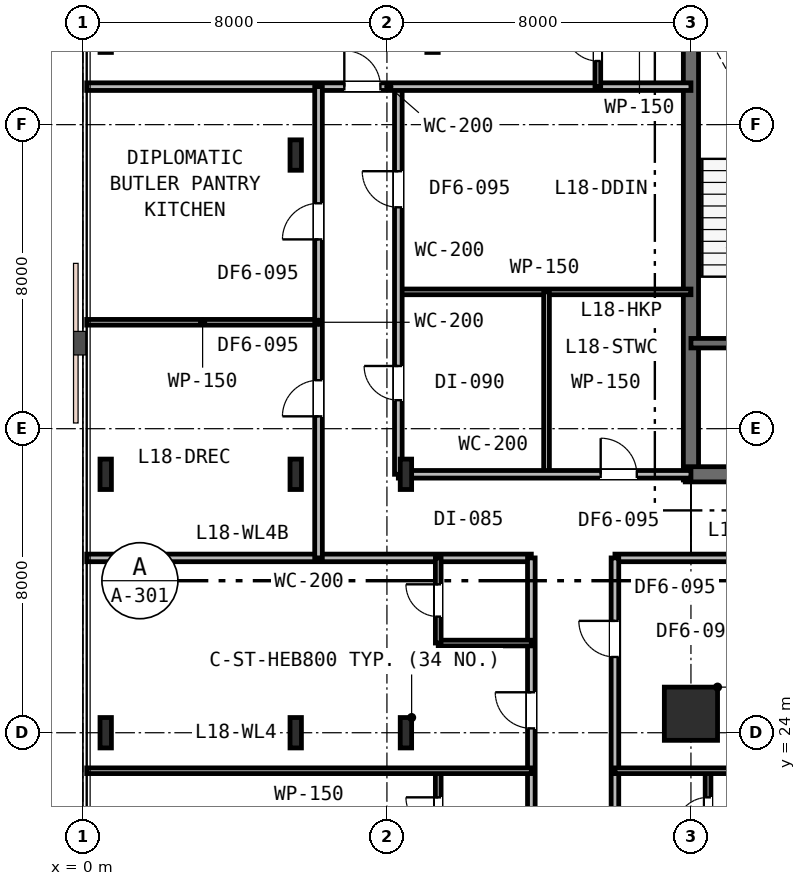
"""IFC4 building model, lengths in metres.
Left out: names, types, materials, properties, quantities, classifications, styles, units other than length and angle.
Written with IfcOpenShell. Run it as: python <this file> out.ifc"""

import sys

from ifc_helpers import new_model, si_unit, direction, frame, frame_2d, origin, origin_2d, place, context, subcontext, project, spatial, rectangle, i_section, extrude, element, fill, save


model = new_model("IFC4")
c1 = context("Model", 3, precision=1e-05, world=origin(), true_north=direction((0.0, 1.0)))
c2 = subcontext(c1, "Body", "Model", "MODEL_VIEW")
j1 = project(units=[si_unit("LENGTHUNIT", "METRE"), si_unit("PLANEANGLEUNIT", "RADIAN")], contexts=[c1])
p1 = place(None, origin())
s1 = spatial("IfcSite", under=j1, at=p1, CompositionType="ELEMENT")
p2 = place(p1, origin())
s2 = spatial("IfcBuilding", under=s1, at=p2, CompositionType="ELEMENT")
p3 = place(p2, frame((0.0, 0.0, 72.6)))
s3 = spatial("IfcBuildingStorey", under=s2, at=p3, CompositionType="ELEMENT", Elevation=72.6)
p4 = place(p3, frame((16.0, 30.65, 0.0), z_axis=(0.0, 0.0, 1.0), x_axis=(0.0, 1.0, 0.0)))
e1 = element("IfcWall", 1, at=p4, inside=s3, PredefinedType="SHEAR", context=c2, shape_type="SweptSolid", body=[
    extrude(rectangle(XDim=12.3, YDim=0.4, at=frame_2d((6.15, 0.0))), origin(), (0.0, 0.0, 1.0), 3.6),
])
p5 = place(p3, frame((15.85, 30.8, 0.0), z_axis=(0.0, 0.0, 1.0), x_axis=(1.0, 0.0, 0.0)))
e2 = element("IfcWall", 2, at=p5, inside=s3, PredefinedType="SHEAR", context=c2, shape_type="SweptSolid", body=[
    extrude(rectangle(XDim=11.2, YDim=0.4, at=frame_2d((5.6, 0.0))), origin(), (0.0, 0.0, 1.0), 3.6),
])
p6 = place(p5, frame((2.45, 0.0, 0.0)))
e3 = element("IfcOpeningElement", 3, at=p6, cuts=e2, PredefinedType="OPENING", context=c2, shape_type="SweptSolid", body=[
    extrude(rectangle(XDim=1.1, YDim=2.15, at=frame_2d((0.55, 1.075))), frame((0.0, 0.21, 0.0), z_axis=(0.0, -1.0, 0.0), x_axis=(1.0, 0.0, 0.0)), (0.0, 0.0, 1.0), 0.42),
])
p7 = place(p3, frame((16.0, 34.25, 0.0), z_axis=(0.0, 0.0, 1.0), x_axis=(1.0, 0.0, 0.0)))
e4 = element("IfcWall", 4, at=p7, inside=s3, PredefinedType="SHEAR", context=c2, shape_type="SweptSolid", body=[
    extrude(rectangle(XDim=6.05, YDim=0.25, at=frame_2d((3.025, 0.0))), origin(), (0.0, 0.0, 1.0), 3.6),
])
p8 = place(p7, frame((1.25, 0.0, 0.0)))
e5 = element("IfcOpeningElement", 5, at=p8, cuts=e4, PredefinedType="OPENING", context=c2, shape_type="SweptSolid", body=[
    extrude(rectangle(XDim=1.0, YDim=2.15, at=frame_2d((0.5, 1.075))), frame((0.0, 0.135, 0.0), z_axis=(0.0, -1.0, 0.0), x_axis=(1.0, 0.0, 0.0)), (0.0, 0.0, 1.0), 0.27),
])
p9 = place(p7, frame((4.2, 0.0, 0.0)))
e6 = element("IfcOpeningElement", 6, at=p9, cuts=e4, PredefinedType="OPENING", context=c2, shape_type="SweptSolid", body=[
    extrude(rectangle(XDim=1.1, YDim=2.15, at=frame_2d((0.55, 1.075))), frame((0.0, 0.135, 0.0), z_axis=(0.0, -1.0, 0.0), x_axis=(1.0, 0.0, 0.0)), (0.0, 0.0, 1.0), 0.27),
])
p10 = place(p3, frame((8.5, 24.0, 0.0), z_axis=(0.0, 0.0, 1.0), x_axis=(1.0, 0.0, 0.0)))
e7 = element("IfcColumn", 7, at=p10, inside=s3, PredefinedType="COLUMN", context=c2, shape_type="SweptSolid", body=[
    extrude(i_section(OverallWidth=0.3, OverallDepth=0.8, WebThickness=0.018, FlangeThickness=0.033, FilletRadius=0.03, at=origin_2d()), origin(), (0.0, 0.0, 1.0), 3.6),
])
p11 = place(p3, frame((16.0, 24.5, 0.0), z_axis=(0.0, 0.0, 1.0), x_axis=(1.0, 0.0, 0.0)))
e8 = element("IfcColumn", 8, at=p11, inside=s3, PredefinedType="COLUMN", context=c2, shape_type="SweptSolid", body=[
    extrude(rectangle(XDim=1.4, YDim=1.4, at=origin_2d()), origin(), (0.0, 0.0, 1.0), 3.6),
])
for number, where, z_axis, x_axis in (
    (9, (5.6, 24.0, 0.0), (0.0, 0.0, 1.0), (1.0, 0.0, 0.0)),
    (10, (5.6, 30.8, 0.0), (0.0, 0.0, 1.0), (1.0, 0.0, 0.0)),
    (11, (5.6, 39.2, 0.0), (0.0, 0.0, 1.0), (1.0, 0.0, 0.0)),
    (12, (8.5, 30.8, 0.0), (0.0, 0.0, 1.0), (1.0, 0.0, 0.0)),
    (13, (9.2, 42.3, 0.0), (0.0, 0.0, 1.0), (1.0, 0.0, 0.0)),
    (14, (0.6, 24.0, 0.0), (0.0, 0.0, 1.0), (1.0, 0.0, 0.0)),
    (15, (0.6, 30.8, 0.0), (0.0, 0.0, 1.0), (1.0, 0.0, 0.0)),
    (16, (0.6, 42.3, 0.0), (0.0, 0.0, 1.0), (1.0, 0.0, 0.0)),
):
    element("IfcColumn", number, at=place(p3, frame(where, z_axis=z_axis, x_axis=x_axis)), inside=s3, PredefinedType="COLUMN", context=c2, shape_type="SweptSolid", body=[
        extrude(i_section(OverallWidth=0.3, OverallDepth=0.8, WebThickness=0.018, FlangeThickness=0.033, FilletRadius=0.03, at=origin_2d()), origin(), (0.0, 0.0, 1.0), 3.6),
    ])
p12 = place(p3, frame((0.1, 28.6, 0.0), z_axis=(0.0, 0.0, 1.0), x_axis=(1.0, 0.0, 0.0)))
e17 = element("IfcWall", 17, at=p12, inside=s3, PredefinedType="PARTITIONING", context=c2, shape_type="SweptSolid", body=[
    extrude(rectangle(XDim=11.7, YDim=0.2, at=frame_2d((5.85, 0.0))), origin(), (0.0, 0.0, 1.0), 2.83),
])
p13 = place(p3, frame((14.0, 28.6, 0.0), z_axis=(0.0, 0.0, 1.0), x_axis=(1.0, 0.0, 0.0)))
e18 = element("IfcWall", 18, at=p13, inside=s3, PredefinedType="PARTITIONING", context=c2, shape_type="SweptSolid", body=[
    extrude(rectangle(XDim=36.4, YDim=0.2, at=frame_2d((18.2, 0.0))), origin(), (0.0, 0.0, 1.0), 2.83),
])
p14 = place(p13, frame((15.475, 0.0, 0.0)))
e19 = element("IfcOpeningElement", 19, at=p14, cuts=e18, PredefinedType="OPENING", context=c2, shape_type="SweptSolid", body=[
    extrude(rectangle(XDim=0.95, YDim=2.15, at=frame_2d((0.475, 1.075))), frame((0.0, 0.11, 0.0), z_axis=(0.0, -1.0, 0.0), x_axis=(1.0, 0.0, 0.0)), (0.0, 0.0, 1.0), 0.22),
])
p15 = place(p13, frame((27.986, 0.0, 0.0)))
e20 = element("IfcOpeningElement", 20, at=p15, cuts=e18, PredefinedType="OPENING", context=c2, shape_type="SweptSolid", body=[
    extrude(rectangle(XDim=0.95, YDim=2.15, at=frame_2d((0.475, 1.075))), frame((0.0, 0.11, 0.0), z_axis=(0.0, -1.0, 0.0), x_axis=(1.0, 0.0, 0.0)), (0.0, 0.0, 1.0), 0.22),
])
p16 = place(p3, frame((8.3, 35.6, 0.0), z_axis=(0.0, 0.0, 1.0), x_axis=(1.0, 0.0, 0.0)))
e21 = element("IfcWall", 21, at=p16, inside=s3, PredefinedType="PARTITIONING", context=c2, shape_type="SweptSolid", body=[
    extrude(rectangle(XDim=7.7, YDim=0.15, at=frame_2d((3.85, 0.0))), origin(), (0.0, 0.0, 1.0), 2.83),
])
p17 = place(p3, frame((12.2, 30.8, 0.0), z_axis=(0.0, 0.0, 1.0), x_axis=(0.0, 1.0, 0.0)))
e22 = element("IfcWall", 22, at=p17, inside=s3, PredefinedType="PARTITIONING", context=c2, shape_type="SweptSolid", body=[
    extrude(rectangle(XDim=4.8, YDim=0.15, at=frame_2d((2.4, 0.0))), origin(), (0.0, 0.0, 1.0), 2.83),
])
p18 = place(p3, frame((8.3, 30.8, 0.0), z_axis=(0.0, 0.0, 1.0), x_axis=(1.0, 0.0, 0.0)))
e23 = element("IfcWall", 23, at=p18, inside=s3, PredefinedType="PARTITIONING", context=c2, shape_type="SweptSolid", body=[
    extrude(rectangle(XDim=7.7, YDim=0.2, at=frame_2d((3.85, 0.0))), origin(), (0.0, 0.0, 1.0), 2.83),
])
p19 = place(p18, frame((5.325, 0.0, 0.0)))
e24 = element("IfcOpeningElement", 24, at=p19, cuts=e23, PredefinedType="OPENING", context=c2, shape_type="SweptSolid", body=[
    extrude(rectangle(XDim=0.95, YDim=2.15, at=frame_2d((0.475, 1.075))), frame((0.0, 0.11, 0.0), z_axis=(0.0, -1.0, 0.0), x_axis=(1.0, 0.0, 0.0)), (0.0, 0.0, 1.0), 0.22),
])
p20 = place(p3, frame((8.3, 30.8, 0.0), z_axis=(0.0, 0.0, 1.0), x_axis=(0.0, 1.0, 0.0)))
e25 = element("IfcWall", 25, at=p20, inside=s3, PredefinedType="PARTITIONING", context=c2, shape_type="SweptSolid", body=[
    extrude(rectangle(XDim=10.2, YDim=0.2, at=frame_2d((5.1, 0.0))), origin(), (0.0, 0.0, 1.0), 2.83),
])
p21 = place(p20, frame((1.95, 0.0, 0.0)))
e26 = element("IfcOpeningElement", 26, at=p21, cuts=e25, PredefinedType="OPENING", context=c2, shape_type="SweptSolid", body=[
    extrude(rectangle(XDim=0.9, YDim=2.15, at=frame_2d((0.45, 1.075))), frame((0.0, 0.11, 0.0), z_axis=(0.0, -1.0, 0.0), x_axis=(1.0, 0.0, 0.0)), (0.0, 0.0, 1.0), 0.22),
])
p22 = place(p20, frame((7.025, 0.0, 0.0)))
e27 = element("IfcOpeningElement", 27, at=p22, cuts=e25, PredefinedType="OPENING", context=c2, shape_type="SweptSolid", body=[
    extrude(rectangle(XDim=0.95, YDim=2.15, at=frame_2d((0.475, 1.075))), frame((0.0, 0.11, 0.0), z_axis=(0.0, -1.0, 0.0), x_axis=(1.0, 0.0, 0.0)), (0.0, 0.0, 1.0), 0.22),
])
p23 = place(p3, frame((0.1, 41.0, 0.0), z_axis=(0.0, 0.0, 1.0), x_axis=(1.0, 0.0, 0.0)))
e28 = element("IfcWall", 28, at=p23, inside=s3, PredefinedType="PARTITIONING", context=c2, shape_type="SweptSolid", body=[
    extrude(rectangle(XDim=15.9, YDim=0.2, at=frame_2d((7.95, 0.0))), origin(), (0.0, 0.0, 1.0), 2.83),
])
p24 = place(p23, frame((6.779, 0.0, 0.0)))
e29 = element("IfcOpeningElement", 29, at=p24, cuts=e28, PredefinedType="OPENING", context=c2, shape_type="SweptSolid", body=[
    extrude(rectangle(XDim=0.95, YDim=2.15, at=frame_2d((0.475, 1.075))), frame((0.0, 0.11, 0.0), z_axis=(0.0, -1.0, 0.0), x_axis=(1.0, 0.0, 0.0)), (0.0, 0.0, 1.0), 0.22),
])
p25 = place(p3, frame((13.55, 41.0, 0.0), z_axis=(0.0, 0.0, 1.0), x_axis=(0.0, 1.0, 0.0)))
e30 = element("IfcWall", 30, at=p25, inside=s3, PredefinedType="PARTITIONING", context=c2, shape_type="SweptSolid", body=[
    extrude(rectangle(XDim=2.2, YDim=0.15, at=frame_2d((1.1, 0.0))), origin(), (0.0, 0.0, 1.0), 3.33),
])
p26 = place(p25, frame((0.675, 0.0, 0.0)))
e31 = element("IfcOpeningElement", 31, at=p26, cuts=e30, PredefinedType="OPENING", context=c2, shape_type="SweptSolid", body=[
    extrude(rectangle(XDim=0.85, YDim=2.15, at=frame_2d((0.425, 1.075))), frame((0.0, 0.085, 0.0), z_axis=(0.0, -1.0, 0.0), x_axis=(1.0, 0.0, 0.0)), (0.0, 0.0, 1.0), 0.17),
])
p27 = place(p3, frame((0.1, 34.8, 0.0), z_axis=(0.0, 0.0, 1.0), x_axis=(1.0, 0.0, 0.0)))
e32 = element("IfcWall", 32, at=p27, inside=s3, PredefinedType="PARTITIONING", context=c2, shape_type="SweptSolid", body=[
    extrude(rectangle(XDim=6.1, YDim=0.15, at=frame_2d((3.05, 0.0))), origin(), (0.0, 0.0, 1.0), 2.83),
])
p28 = place(p3, frame((6.2, 28.6, 0.0), z_axis=(0.0, 0.0, 1.0), x_axis=(0.0, 1.0, 0.0)))
e33 = element("IfcWall", 33, at=p28, inside=s3, PredefinedType="PARTITIONING", context=c2, shape_type="SweptSolid", body=[
    extrude(rectangle(XDim=12.4, YDim=0.2, at=frame_2d((6.2, 0.0))), origin(), (0.0, 0.0, 1.0), 2.83),
])
p29 = place(p28, frame((3.725, 0.0, 0.0)))
e34 = element("IfcOpeningElement", 34, at=p29, cuts=e33, PredefinedType="OPENING", context=c2, shape_type="SweptSolid", body=[
    extrude(rectangle(XDim=0.95, YDim=2.15, at=frame_2d((0.475, 1.075))), frame((0.0, 0.11, 0.0), z_axis=(0.0, -1.0, 0.0), x_axis=(1.0, 0.0, 0.0)), (0.0, 0.0, 1.0), 0.22),
])
p30 = place(p28, frame((8.381, 0.0, 0.0)))
e35 = element("IfcOpeningElement", 35, at=p30, cuts=e33, PredefinedType="OPENING", context=c2, shape_type="SweptSolid", body=[
    extrude(rectangle(XDim=0.95, YDim=2.15, at=frame_2d((0.475, 1.075))), frame((0.0, 0.11, 0.0), z_axis=(0.0, -1.0, 0.0), x_axis=(1.0, 0.0, 0.0)), (0.0, 0.0, 1.0), 0.22),
])
p31 = place(p3, frame((11.8, 5.6, 0.0), z_axis=(0.0, 0.0, 1.0), x_axis=(0.0, 1.0, 0.0)))
e36 = element("IfcWall", 36, at=p31, inside=s3, PredefinedType="PARTITIONING", context=c2, shape_type="SweptSolid", body=[
    extrude(rectangle(XDim=23.0, YDim=0.2, at=frame_2d((11.5, 0.0))), origin(), (0.0, 0.0, 1.0), 2.83),
])
p32 = place(p31, frame((1.2, 0.0, 0.0)))
e37 = element("IfcOpeningElement", 37, at=p32, cuts=e36, PredefinedType="OPENING", context=c2, shape_type="SweptSolid", body=[
    extrude(rectangle(XDim=0.95, YDim=2.15, at=frame_2d((0.475, 1.075))), frame((0.0, 0.11, 0.0), z_axis=(0.0, -1.0, 0.0), x_axis=(1.0, 0.0, 0.0)), (0.0, 0.0, 1.0), 0.22),
])
p33 = place(p31, frame((7.0, 0.0, 0.0)))
e38 = element("IfcOpeningElement", 38, at=p33, cuts=e36, PredefinedType="OPENING", context=c2, shape_type="SweptSolid", body=[
    extrude(rectangle(XDim=0.95, YDim=2.15, at=frame_2d((0.475, 1.075))), frame((0.0, 0.11, 0.0), z_axis=(0.0, -1.0, 0.0), x_axis=(1.0, 0.0, 0.0)), (0.0, 0.0, 1.0), 0.22),
])
p34 = place(p31, frame((12.8, 0.0, 0.0)))
e39 = element("IfcOpeningElement", 39, at=p34, cuts=e36, PredefinedType="OPENING", context=c2, shape_type="SweptSolid", body=[
    extrude(rectangle(XDim=0.95, YDim=2.15, at=frame_2d((0.475, 1.075))), frame((0.0, 0.11, 0.0), z_axis=(0.0, -1.0, 0.0), x_axis=(1.0, 0.0, 0.0)), (0.0, 0.0, 1.0), 0.22),
])
p35 = place(p31, frame((18.515, 0.0, 0.0)))
e40 = element("IfcOpeningElement", 40, at=p35, cuts=e36, PredefinedType="OPENING", context=c2, shape_type="SweptSolid", body=[
    extrude(rectangle(XDim=0.95, YDim=2.15, at=frame_2d((0.475, 1.075))), frame((0.0, 0.11, 0.0), z_axis=(0.0, -1.0, 0.0), x_axis=(1.0, 0.0, 0.0)), (0.0, 0.0, 1.0), 0.22),
])
p36 = place(p3, frame((14.0, 5.6, 0.0), z_axis=(0.0, 0.0, 1.0), x_axis=(0.0, 1.0, 0.0)))
e41 = element("IfcWall", 41, at=p36, inside=s3, PredefinedType="PARTITIONING", context=c2, shape_type="SweptSolid", body=[
    extrude(rectangle(XDim=23.0, YDim=0.2, at=frame_2d((11.5, 0.0))), origin(), (0.0, 0.0, 1.0), 2.83),
])
p37 = place(p36, frame((0.74, 0.0, 0.0)))
e42 = element("IfcOpeningElement", 42, at=p37, cuts=e41, PredefinedType="OPENING", context=c2, shape_type="SweptSolid", body=[
    extrude(rectangle(XDim=0.95, YDim=2.15, at=frame_2d((0.475, 1.075))), frame((0.0, 0.11, 0.0), z_axis=(0.0, -1.0, 0.0), x_axis=(1.0, 0.0, 0.0)), (0.0, 0.0, 1.0), 0.22),
])
p38 = place(p36, frame((6.271, 0.0, 0.0)))
e43 = element("IfcOpeningElement", 43, at=p38, cuts=e41, PredefinedType="OPENING", context=c2, shape_type="SweptSolid", body=[
    extrude(rectangle(XDim=0.95, YDim=2.15, at=frame_2d((0.475, 1.075))), frame((0.0, 0.11, 0.0), z_axis=(0.0, -1.0, 0.0), x_axis=(1.0, 0.0, 0.0)), (0.0, 0.0, 1.0), 0.22),
])
p39 = place(p36, frame((13.626, 0.0, 0.0)))
e44 = element("IfcOpeningElement", 44, at=p39, cuts=e41, PredefinedType="OPENING", context=c2, shape_type="SweptSolid", body=[
    extrude(rectangle(XDim=0.95, YDim=2.15, at=frame_2d((0.475, 1.075))), frame((0.0, 0.11, 0.0), z_axis=(0.0, -1.0, 0.0), x_axis=(1.0, 0.0, 0.0)), (0.0, 0.0, 1.0), 0.22),
])
p40 = place(p36, frame((20.393, 0.0, 0.0)))
e45 = element("IfcOpeningElement", 45, at=p40, cuts=e41, PredefinedType="OPENING", context=c2, shape_type="SweptSolid", body=[
    extrude(rectangle(XDim=0.95, YDim=2.15, at=frame_2d((0.475, 1.075))), frame((0.0, 0.11, 0.0), z_axis=(0.0, -1.0, 0.0), x_axis=(1.0, 0.0, 0.0)), (0.0, 0.0, 1.0), 0.22),
])
p41 = place(p3, frame((9.35, 20.75, 0.0), z_axis=(0.0, 0.0, 1.0), x_axis=(0.0, 1.0, 0.0)))
e46 = element("IfcWall", 46, at=p41, inside=s3, PredefinedType="PARTITIONING", context=c2, shape_type="SweptSolid", body=[
    extrude(rectangle(XDim=2.25, YDim=0.15, at=frame_2d((1.125, 0.0))), origin(), (0.0, 0.0, 1.0), 3.33),
])
p42 = place(p41, frame((0.7, 0.0, 0.0)))
e47 = element("IfcOpeningElement", 47, at=p42, cuts=e46, PredefinedType="OPENING", context=c2, shape_type="SweptSolid", body=[
    extrude(rectangle(XDim=0.85, YDim=2.15, at=frame_2d((0.425, 1.075))), frame((0.0, 0.085, 0.0), z_axis=(0.0, -1.0, 0.0), x_axis=(1.0, 0.0, 0.0)), (0.0, 0.0, 1.0), 0.17),
])
p43 = place(p3, frame((0.1, 23.0, 0.0), z_axis=(0.0, 0.0, 1.0), x_axis=(1.0, 0.0, 0.0)))
e48 = element("IfcWall", 48, at=p43, inside=s3, PredefinedType="PARTITIONING", context=c2, shape_type="SweptSolid", body=[
    extrude(rectangle(XDim=11.7, YDim=0.15, at=frame_2d((5.85, 0.0))), origin(), (0.0, 0.0, 1.0), 2.83),
])
p44 = place(p3, frame((16.45, 20.75, 0.0), z_axis=(0.0, 0.0, 1.0), x_axis=(0.0, 1.0, 0.0)))
e49 = element("IfcWall", 49, at=p44, inside=s3, PredefinedType="PARTITIONING", context=c2, shape_type="SweptSolid", body=[
    extrude(rectangle(XDim=2.25, YDim=0.15, at=frame_2d((1.125, 0.0))), origin(), (0.0, 0.0, 1.0), 2.83),
])
p45 = place(p44, frame((0.7, 0.0, 0.0)))
e50 = element("IfcOpeningElement", 50, at=p45, cuts=e49, PredefinedType="OPENING", context=c2, shape_type="SweptSolid", body=[
    extrude(rectangle(XDim=0.85, YDim=2.15, at=frame_2d((0.425, 1.075))), frame((0.0, 0.085, 0.0), z_axis=(0.0, -1.0, 0.0), x_axis=(1.0, 0.0, 0.0)), (0.0, 0.0, 1.0), 0.17),
])
p46 = place(p3, frame((14.0, 23.0, 0.0), z_axis=(0.0, 0.0, 1.0), x_axis=(1.0, 0.0, 0.0)))
e51 = element("IfcWall", 51, at=p46, inside=s3, PredefinedType="PARTITIONING", context=c2, shape_type="SweptSolid", body=[
    extrude(rectangle(XDim=9.9, YDim=0.15, at=frame_2d((4.95, 0.0))), origin(), (0.0, 0.0, 1.0), 2.83),
])
p47 = place(p3, frame((9.35, 26.36, 0.0), z_axis=(0.0, 0.0, 1.0), x_axis=(1.0, 0.0, 0.0)))
e52 = element("IfcWall", 52, at=p47, inside=s3, PredefinedType="PARTITIONING", context=c2, shape_type="SweptSolid", body=[
    extrude(rectangle(XDim=2.45, YDim=0.15, at=frame_2d((1.225, 0.0))), origin(), (0.0, 0.0, 1.0), 3.33),
])
p48 = place(p3, frame((9.35, 26.36, 0.0), z_axis=(0.0, 0.0, 1.0), x_axis=(0.0, 1.0, 0.0)))
e53 = element("IfcWall", 53, at=p48, inside=s3, PredefinedType="PARTITIONING", context=c2, shape_type="SweptSolid", body=[
    extrude(rectangle(XDim=2.24, YDim=0.15, at=frame_2d((1.12, 0.0))), origin(), (0.0, 0.0, 1.0), 3.33),
])
p49 = place(p48, frame((0.695, 0.0, 0.0)))
e54 = element("IfcOpeningElement", 54, at=p49, cuts=e53, PredefinedType="OPENING", context=c2, shape_type="SweptSolid", body=[
    extrude(rectangle(XDim=0.85, YDim=2.15, at=frame_2d((0.425, 1.075))), frame((0.0, 0.085, 0.0), z_axis=(0.0, -1.0, 0.0), x_axis=(1.0, 0.0, 0.0)), (0.0, 0.0, 1.0), 0.17),
])
p50 = place(p19, origin())
e55 = element("IfcDoor", 55, at=p50, inside=s3, OperationType="SINGLE_SWING_LEFT", PredefinedType="DOOR", context=c2, shape_type="SweptSolid", body=[
    extrude(rectangle(XDim=0.95, YDim=2.15, at=frame_2d((0.475, 1.075))), frame((0.0, 0.025, 0.0), z_axis=(0.0, -1.0, 0.0), x_axis=(1.0, 0.0, 0.0)), (0.0, 0.0, 1.0), 0.05),
])
fill(e24, e55)
p51 = place(p21, origin())
e56 = element("IfcDoor", 56, at=p51, inside=s3, OperationType="SINGLE_SWING_RIGHT", PredefinedType="DOOR", context=c2, shape_type="SweptSolid", body=[
    extrude(rectangle(XDim=0.9, YDim=2.15, at=frame_2d((0.45, 1.075))), frame((0.0, 0.025, 0.0), z_axis=(0.0, -1.0, 0.0), x_axis=(1.0, 0.0, 0.0)), (0.0, 0.0, 1.0), 0.05),
])
fill(e26, e56)
p52 = place(p24, origin())
e57 = element("IfcDoor", 57, at=p52, inside=s3, OperationType="SINGLE_SWING_LEFT", PredefinedType="DOOR", context=c2, shape_type="SweptSolid", body=[
    extrude(rectangle(XDim=0.95, YDim=2.15, at=frame_2d((0.475, 1.075))), frame((0.0, 0.025, 0.0), z_axis=(0.0, -1.0, 0.0), x_axis=(1.0, 0.0, 0.0)), (0.0, 0.0, 1.0), 0.05),
])
fill(e29, e57)
p53 = place(p26, origin())
e58 = element("IfcDoor", 58, at=p53, inside=s3, OperationType="SINGLE_SWING_RIGHT", PredefinedType="DOOR", context=c2, shape_type="SweptSolid", body=[
    extrude(rectangle(XDim=0.85, YDim=2.15, at=frame_2d((0.425, 1.075))), frame((0.0, 0.025, 0.0), z_axis=(0.0, -1.0, 0.0), x_axis=(1.0, 0.0, 0.0)), (0.0, 0.0, 1.0), 0.05),
])
fill(e31, e58)
p54 = place(p29, origin())
e59 = element("IfcDoor", 59, at=p54, inside=s3, OperationType="SINGLE_SWING_LEFT", PredefinedType="DOOR", context=c2, shape_type="SweptSolid", body=[
    extrude(rectangle(XDim=0.95, YDim=2.15, at=frame_2d((0.475, 1.075))), frame((0.0, 0.025, 0.0), z_axis=(0.0, -1.0, 0.0), x_axis=(1.0, 0.0, 0.0)), (0.0, 0.0, 1.0), 0.05),
])
fill(e34, e59)
p55 = place(p30, origin())
e60 = element("IfcDoor", 60, at=p55, inside=s3, OperationType="SINGLE_SWING_LEFT", PredefinedType="DOOR", context=c2, shape_type="SweptSolid", body=[
    extrude(rectangle(XDim=0.95, YDim=2.15, at=frame_2d((0.475, 1.075))), frame((0.0, 0.025, 0.0), z_axis=(0.0, -1.0, 0.0), x_axis=(1.0, 0.0, 0.0)), (0.0, 0.0, 1.0), 0.05),
])
fill(e35, e60)
p56 = place(p22, origin())
e61 = element("IfcDoor", 61, at=p56, inside=s3, OperationType="SINGLE_SWING_RIGHT", PredefinedType="DOOR", context=c2, shape_type="SweptSolid", body=[
    extrude(rectangle(XDim=0.95, YDim=2.15, at=frame_2d((0.475, 1.075))), frame((0.0, 0.025, 0.0), z_axis=(0.0, -1.0, 0.0), x_axis=(1.0, 0.0, 0.0)), (0.0, 0.0, 1.0), 0.05),
])
fill(e27, e61)
p57 = place(p42, origin())
e62 = element("IfcDoor", 62, at=p57, inside=s3, OperationType="SINGLE_SWING_RIGHT", PredefinedType="DOOR", context=c2, shape_type="SweptSolid", body=[
    extrude(rectangle(XDim=0.85, YDim=2.15, at=frame_2d((0.425, 1.075))), frame((0.0, 0.025, 0.0), z_axis=(0.0, -1.0, 0.0), x_axis=(1.0, 0.0, 0.0)), (0.0, 0.0, 1.0), 0.05),
])
fill(e47, e62)
p58 = place(p45, origin())
e63 = element("IfcDoor", 63, at=p58, inside=s3, OperationType="SINGLE_SWING_LEFT", PredefinedType="DOOR", context=c2, shape_type="SweptSolid", body=[
    extrude(rectangle(XDim=0.85, YDim=2.15, at=frame_2d((0.425, 1.075))), frame((0.0, 0.025, 0.0), z_axis=(0.0, -1.0, 0.0), x_axis=(1.0, 0.0, 0.0)), (0.0, 0.0, 1.0), 0.05),
])
fill(e50, e63)
p59 = place(p35, origin())
e64 = element("IfcDoor", 64, at=p59, inside=s3, OperationType="SINGLE_SWING_RIGHT", PredefinedType="DOOR", context=c2, shape_type="SweptSolid", body=[
    extrude(rectangle(XDim=0.95, YDim=2.15, at=frame_2d((0.475, 1.075))), frame((0.0, 0.025, 0.0), z_axis=(0.0, -1.0, 0.0), x_axis=(1.0, 0.0, 0.0)), (0.0, 0.0, 1.0), 0.05),
])
fill(e40, e64)
p60 = place(p49, origin())
e65 = element("IfcDoor", 65, at=p60, inside=s3, OperationType="SINGLE_SWING_RIGHT", PredefinedType="DOOR", context=c2, shape_type="SweptSolid", body=[
    extrude(rectangle(XDim=0.85, YDim=2.15, at=frame_2d((0.425, 1.075))), frame((0.0, 0.025, 0.0), z_axis=(0.0, -1.0, 0.0), x_axis=(1.0, 0.0, 0.0)), (0.0, 0.0, 1.0), 0.05),
])
fill(e54, e65)
p61 = place(p40, origin())
e66 = element("IfcDoor", 66, at=p61, inside=s3, OperationType="SINGLE_SWING_RIGHT", PredefinedType="DOOR", context=c2, shape_type="SweptSolid", body=[
    extrude(rectangle(XDim=0.95, YDim=2.15, at=frame_2d((0.475, 1.075))), frame((0.0, 0.025, 0.0), z_axis=(0.0, -1.0, 0.0), x_axis=(1.0, 0.0, 0.0)), (0.0, 0.0, 1.0), 0.05),
])
fill(e45, e66)
save(model, sys.argv[1])
